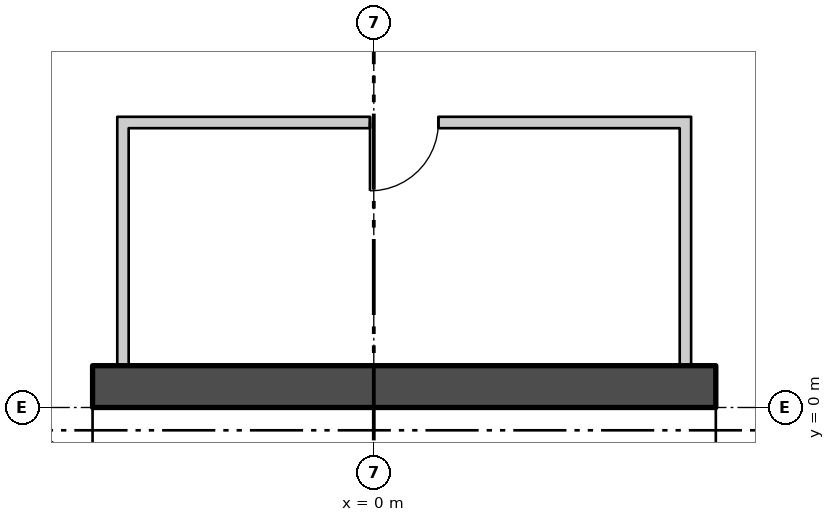
"""IFC4 building model, lengths in metres.
Left out: names, types, materials, properties, quantities, classifications, styles, units other than length and angle.
Written with IfcOpenShell. Run it as: python <this file> out.ifc"""

import sys

from ifc_helpers import new_model, si_unit, direction, frame, frame_2d, origin, place, context, subcontext, project, spatial, polyline, rectangle, outline, extrude, element, fill, save


model = new_model("IFC4")
c1 = context("Model", 3, precision=1e-05, world=origin(), true_north=direction((0.0, 1.0)))
c2 = subcontext(c1, "Body", "Model", "MODEL_VIEW")
j1 = project(units=[si_unit("LENGTHUNIT", "METRE"), si_unit("PLANEANGLEUNIT", "RADIAN")], contexts=[c1])
p1 = place(None, origin())
s1 = spatial("IfcSite", under=j1, at=p1, CompositionType="ELEMENT")
p2 = place(p1, origin())
s2 = spatial("IfcBuilding", under=s1, at=p2, CompositionType="ELEMENT")
p3 = place(p2, frame((0.0, 0.0, 97.8)))
s3 = spatial("IfcBuildingStorey", under=s2, at=p3, CompositionType="ELEMENT", Elevation=97.8)
p4 = place(p3, frame((4.905, -28.133, -0.18), z_axis=(0.0, 0.0, 1.0), x_axis=(0.500000711659, 0.866024992908, 0.0)))
e1 = element("IfcWall", 1, at=p4, inside=s3, PredefinedType="SOLIDWALL", context=c2, shape_type="SweptSolid", body=[
    extrude(outline(polyline([(-0.13, -0.225), (45.87, -0.225), (45.61, 0.225), (0.13, 0.225), (-0.13, -0.225)])), origin(), (0.0, 0.0, 1.0), 4.28),
])
p5 = place(p4, frame((1.424, 0.0, 1.08)))
e2 = element("IfcOpeningElement", 2, at=p5, cuts=e1, PredefinedType="OPENING", context=c2, shape_type="SweptSolid", body=[
    extrude(rectangle(XDim=2.4, YDim=2.6, at=frame_2d((1.2, 1.3))), frame((0.0, 0.235, 0.0), z_axis=(0.0, -1.0, 0.0), x_axis=(1.0, 0.0, 0.0)), (0.0, 0.0, 1.0), 0.47),
])
p6 = place(p4, frame((5.893, 0.0, 1.08)))
e3 = element("IfcOpeningElement", 3, at=p6, cuts=e1, PredefinedType="OPENING", context=c2, shape_type="SweptSolid", body=[
    extrude(rectangle(XDim=2.4, YDim=2.6, at=frame_2d((1.2, 1.3))), frame((0.0, 0.235, 0.0), z_axis=(0.0, -1.0, 0.0), x_axis=(1.0, 0.0, 0.0)), (0.0, 0.0, 1.0), 0.47),
])
p7 = place(p4, frame((10.401, 0.0, 1.08)))
e4 = element("IfcOpeningElement", 4, at=p7, cuts=e1, PredefinedType="OPENING", context=c2, shape_type="SweptSolid", body=[
    extrude(rectangle(XDim=2.4, YDim=2.6, at=frame_2d((1.2, 1.3))), frame((0.0, 0.235, 0.0), z_axis=(0.0, -1.0, 0.0), x_axis=(1.0, 0.0, 0.0)), (0.0, 0.0, 1.0), 0.47),
])
p8 = place(p4, frame((14.909, 0.0, 1.08)))
e5 = element("IfcOpeningElement", 5, at=p8, cuts=e1, PredefinedType="OPENING", context=c2, shape_type="SweptSolid", body=[
    extrude(rectangle(XDim=2.4, YDim=2.6, at=frame_2d((1.2, 1.3))), frame((0.0, 0.235, 0.0), z_axis=(0.0, -1.0, 0.0), x_axis=(1.0, 0.0, 0.0)), (0.0, 0.0, 1.0), 0.47),
])
p9 = place(p4, frame((19.416, 0.0, 1.08)))
e6 = element("IfcOpeningElement", 6, at=p9, cuts=e1, PredefinedType="OPENING", context=c2, shape_type="SweptSolid", body=[
    extrude(rectangle(XDim=2.4, YDim=2.6, at=frame_2d((1.2, 1.3))), frame((0.0, 0.235, 0.0), z_axis=(0.0, -1.0, 0.0), x_axis=(1.0, 0.0, 0.0)), (0.0, 0.0, 1.0), 0.47),
])
p10 = place(p4, frame((28.431, 0.0, 1.08)))
e7 = element("IfcOpeningElement", 7, at=p10, cuts=e1, PredefinedType="OPENING", context=c2, shape_type="SweptSolid", body=[
    extrude(rectangle(XDim=2.4, YDim=2.6, at=frame_2d((1.2, 1.3))), frame((0.0, 0.235, 0.0), z_axis=(0.0, -1.0, 0.0), x_axis=(1.0, 0.0, 0.0)), (0.0, 0.0, 1.0), 0.47),
])
p11 = place(p4, frame((32.939, 0.0, 1.08)))
e8 = element("IfcOpeningElement", 8, at=p11, cuts=e1, PredefinedType="OPENING", context=c2, shape_type="SweptSolid", body=[
    extrude(rectangle(XDim=2.4, YDim=2.6, at=frame_2d((1.2, 1.3))), frame((0.0, 0.235, 0.0), z_axis=(0.0, -1.0, 0.0), x_axis=(1.0, 0.0, 0.0)), (0.0, 0.0, 1.0), 0.47),
])
p12 = place(p4, frame((37.447, 0.0, 1.08)))
e9 = element("IfcOpeningElement", 9, at=p12, cuts=e1, PredefinedType="OPENING", context=c2, shape_type="SweptSolid", body=[
    extrude(rectangle(XDim=2.4, YDim=2.6, at=frame_2d((1.2, 1.3))), frame((0.0, 0.235, 0.0), z_axis=(0.0, -1.0, 0.0), x_axis=(1.0, 0.0, 0.0)), (0.0, 0.0, 1.0), 0.47),
])
p13 = place(p4, frame((41.916, 0.0, 1.08)))
e10 = element("IfcOpeningElement", 10, at=p13, cuts=e1, PredefinedType="OPENING", context=c2, shape_type="SweptSolid", body=[
    extrude(rectangle(XDim=2.4, YDim=2.6, at=frame_2d((1.2, 1.3))), frame((0.0, 0.235, 0.0), z_axis=(0.0, -1.0, 0.0), x_axis=(1.0, 0.0, 0.0)), (0.0, 0.0, 1.0), 0.47),
])
p14 = place(p3, frame((-17.5, 0.275, 0.0), z_axis=(0.0, 0.0, 1.0), x_axis=(1.0, 0.0, 0.0)))
e11 = element("IfcWall", 11, at=p14, inside=s3, PredefinedType="SHEAR", context=c2, shape_type="SweptSolid", body=[
    extrude(rectangle(XDim=35.0, YDim=0.55, at=frame_2d((17.5, 0.0))), origin(), (0.0, 0.0, 1.0), 4.3),
])
p15 = place(p14, frame((12.0, 0.0, 0.0)))
e12 = element("IfcOpeningElement", 12, at=p15, cuts=e11, PredefinedType="OPENING", context=c2, shape_type="SweptSolid", body=[
    extrude(rectangle(XDim=1.8, YDim=2.4, at=frame_2d((0.9, 1.2))), frame((0.0, 0.285, 0.0), z_axis=(0.0, -1.0, 0.0), x_axis=(1.0, 0.0, 0.0)), (0.0, 0.0, 1.0), 0.57),
])
p16 = place(p14, frame((22.0, 0.0, 0.0)))
e13 = element("IfcOpeningElement", 13, at=p16, cuts=e11, PredefinedType="OPENING", context=c2, shape_type="SweptSolid", body=[
    extrude(rectangle(XDim=1.8, YDim=2.4, at=frame_2d((0.9, 1.2))), frame((0.0, 0.285, 0.0), z_axis=(0.0, -1.0, 0.0), x_axis=(1.0, 0.0, 0.0)), (0.0, 0.0, 1.0), 0.57),
])
for number, where, z_axis, x_axis in (
    (14, (-3.3, 0.55, 0.0), (0.0, 0.0, 1.0), (0.0, 1.0, 0.0)),
    (15, (4.1, 0.55, 0.0), (0.0, 0.0, 1.0), (0.0, 1.0, 0.0)),
):
    element("IfcWall", number, at=place(p3, frame(where, z_axis=z_axis, x_axis=x_axis)), inside=s3, PredefinedType="PARTITIONING", context=c2, shape_type="SweptSolid", body=[
        extrude(rectangle(XDim=3.275, YDim=0.15, at=frame_2d((1.637, 0.0))), origin(), (0.0, 0.0, 1.0), 4.3),
    ])
p17 = place(p3, frame((-3.225, 3.75, 0.0), z_axis=(0.0, 0.0, 1.0), x_axis=(1.0, 0.0, 0.0)))
e16 = element("IfcWall", 16, at=p17, inside=s3, PredefinedType="PARTITIONING", context=c2, shape_type="SweptSolid", body=[
    extrude(rectangle(XDim=7.25, YDim=0.15, at=frame_2d((3.625, 0.0))), origin(), (0.0, 0.0, 1.0), 4.3),
])
p18 = place(p17, frame((3.175, 0.0, 0.0)))
e17 = element("IfcOpeningElement", 17, at=p18, cuts=e16, PredefinedType="OPENING", context=c2, shape_type="SweptSolid", body=[
    extrude(rectangle(XDim=0.9, YDim=2.1, at=frame_2d((0.45, 1.05))), frame((0.0, 0.085, 0.0), z_axis=(0.0, -1.0, 0.0), x_axis=(1.0, 0.0, 0.0)), (0.0, 0.0, 1.0), 0.17),
])
p19 = place(p18, origin())
e18 = element("IfcDoor", 18, at=p19, inside=s3, OperationType="SINGLE_SWING_LEFT", PredefinedType="DOOR", context=c2, shape_type="SweptSolid", body=[
    extrude(rectangle(XDim=0.9, YDim=2.1, at=frame_2d((0.45, 1.05))), frame((0.0, 0.025, 0.0), z_axis=(0.0, -1.0, 0.0), x_axis=(1.0, 0.0, 0.0)), (0.0, 0.0, 1.0), 0.05),
])
fill(e17, e18)
p20 = place(p15, origin())
e19 = element("IfcDoor", 19, at=p20, inside=s3, OperationType="DOUBLE_DOOR_SINGLE_SWING", PredefinedType="DOOR", context=c2, shape_type="SweptSolid", body=[
    extrude(rectangle(XDim=1.8, YDim=2.4, at=frame_2d((0.9, 1.2))), frame((0.0, 0.025, 0.0), z_axis=(0.0, -1.0, 0.0), x_axis=(1.0, 0.0, 0.0)), (0.0, 0.0, 1.0), 0.05),
])
fill(e12, e19)
p21 = place(p16, origin())
e20 = element("IfcDoor", 20, at=p21, inside=s3, OperationType="DOUBLE_DOOR_SINGLE_SWING", PredefinedType="DOOR", context=c2, shape_type="SweptSolid", body=[
    extrude(rectangle(XDim=1.8, YDim=2.4, at=frame_2d((0.9, 1.2))), frame((0.0, 0.025, 0.0), z_axis=(0.0, -1.0, 0.0), x_axis=(1.0, 0.0, 0.0)), (0.0, 0.0, 1.0), 0.05),
])
fill(e13, e20)
save(model, sys.argv[1])
